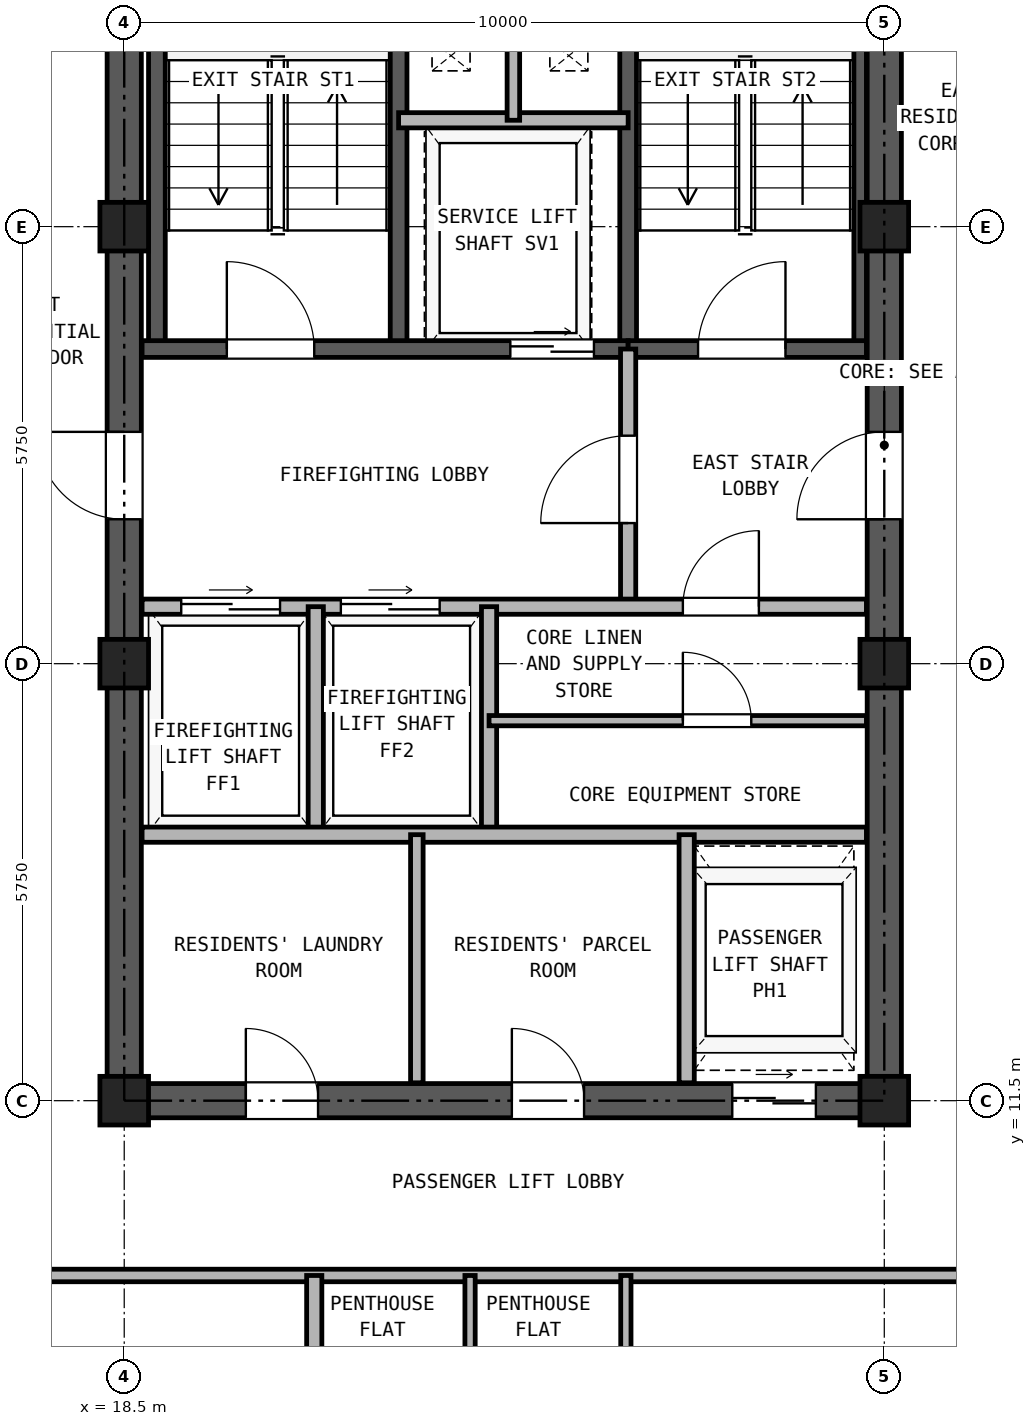
"""IFC4 building model, lengths in metres.
Left out: names, types, materials, properties, quantities, classifications, styles, units other than length and angle.
Written with IfcOpenShell. Run it as: python <this file> out.ifc"""

import sys

from ifc_helpers import new_model, si_unit, direction, frame, frame_2d, origin, origin_2d, place, context, subcontext, project, spatial, rectangle, hollow_rectangle, extrude, source, transform, mapped, element, fill, save


model = new_model("IFC4")
c1 = context("Model", 3, precision=1e-05, world=origin(), true_north=direction((0.0, 1.0)))
c2 = subcontext(c1, "Body", "Model", "MODEL_VIEW")
j1 = project(units=[si_unit("LENGTHUNIT", "METRE"), si_unit("PLANEANGLEUNIT", "RADIAN")], contexts=[c1])
p1 = place(None, origin())
s1 = spatial("IfcSite", under=j1, at=p1, CompositionType="ELEMENT")
p2 = place(p1, origin())
s2 = spatial("IfcBuilding", under=s1, at=p2, CompositionType="ELEMENT")
p3 = place(p2, frame((0.0, 0.0, 181.7)))
s3 = spatial("IfcBuildingStorey", under=s2, at=p3, CompositionType="ELEMENT", Elevation=181.7)
m1 = source(origin(), c2, "Body", "SweptSolid", [
    extrude(hollow_rectangle(XDim=0.64, YDim=0.64, WallThickness=0.035, at=origin_2d()), origin(), (0.0, 0.0, 1.0), 2.95),
])
for number, where, z_axis, x_axis in (
    (1, (18.5, 11.5, 0.0), (0.0, 0.0, 1.0), (1.0, 0.0, 0.0)),
    (2, (18.5, 17.25, 0.0), (0.0, 0.0, 1.0), (1.0, 0.0, 0.0)),
    (3, (18.5, 23.0, 0.0), (0.0, 0.0, 1.0), (1.0, 0.0, 0.0)),
    (4, (28.5, 11.5, 0.0), (0.0, 0.0, 1.0), (1.0, 0.0, 0.0)),
    (5, (28.5, 17.25, 0.0), (0.0, 0.0, 1.0), (1.0, 0.0, 0.0)),
    (6, (28.5, 23.0, 0.0), (0.0, 0.0, 1.0), (1.0, 0.0, 0.0)),
):
    element("IfcColumn", number, at=place(p3, frame(where, z_axis=z_axis, x_axis=x_axis)), inside=s3, PredefinedType="COLUMN", context=c2, shape_type="MappedRepresentation", body=[
        mapped(m1, transform((0.0, 0.0, 0.0), x_axis=(1.0, 0.0, 0.0), y_axis=(0.0, 1.0, 0.0), z_axis=(0.0, 0.0, 1.0), scale=1.0)),
    ])
p4 = place(p3, frame((18.275, 11.5, 0.0), z_axis=(0.0, 0.0, 1.0), x_axis=(1.0, 0.0, 0.0)))
e7 = element("IfcWall", 7, at=p4, inside=s3, PredefinedType="SHEAR", context=c2, shape_type="SweptSolid", body=[
    extrude(rectangle(XDim=10.45, YDim=0.45, at=frame_2d((5.225, 0.0))), origin(), (0.0, 0.0, 1.0), 2.95),
])
p5 = place(p4, frame((1.825, 0.0, 0.0)))
e8 = element("IfcOpeningElement", 8, at=p5, cuts=e7, PredefinedType="OPENING", context=c2, shape_type="SweptSolid", body=[
    extrude(rectangle(XDim=0.95, YDim=2.15, at=frame_2d((0.475, 1.075))), frame((0.0, 0.235, 0.0), z_axis=(0.0, -1.0, 0.0), x_axis=(1.0, 0.0, 0.0)), (0.0, 0.0, 1.0), 0.47),
])
p6 = place(p4, frame((5.325, 0.0, 0.0)))
e9 = element("IfcOpeningElement", 9, at=p6, cuts=e7, PredefinedType="OPENING", context=c2, shape_type="SweptSolid", body=[
    extrude(rectangle(XDim=0.95, YDim=2.15, at=frame_2d((0.475, 1.075))), frame((0.0, 0.235, 0.0), z_axis=(0.0, -1.0, 0.0), x_axis=(1.0, 0.0, 0.0)), (0.0, 0.0, 1.0), 0.47),
])
p7 = place(p4, frame((8.225, 0.0, 0.0)))
e10 = element("IfcOpeningElement", 10, at=p7, cuts=e7, PredefinedType="OPENING", context=c2, shape_type="SweptSolid", body=[
    extrude(rectangle(XDim=1.1, YDim=2.25, at=frame_2d((0.55, 1.125))), frame((0.0, 0.235, 0.0), z_axis=(0.0, -1.0, 0.0), x_axis=(1.0, 0.0, 0.0)), (0.0, 0.0, 1.0), 0.47),
])
p8 = place(p3, frame((18.5, 11.725, 0.0), z_axis=(0.0, 0.0, 1.0), x_axis=(0.0, 1.0, 0.0)))
e11 = element("IfcWall", 11, at=p8, inside=s3, PredefinedType="SHEAR", context=c2, shape_type="SweptSolid", body=[
    extrude(rectangle(XDim=16.8, YDim=0.45, at=frame_2d((8.4, 0.0))), origin(), (0.0, 0.0, 1.0), 2.95),
])
p9 = place(p8, frame((7.425, 0.0, 0.0)))
e12 = element("IfcOpeningElement", 12, at=p9, cuts=e11, PredefinedType="OPENING", context=c2, shape_type="SweptSolid", body=[
    extrude(rectangle(XDim=1.15, YDim=2.2, at=frame_2d((0.575, 1.1))), frame((0.0, 0.235, 0.0), z_axis=(0.0, -1.0, 0.0), x_axis=(1.0, 0.0, 0.0)), (0.0, 0.0, 1.0), 0.47),
])
p10 = place(p3, frame((28.5, 11.725, 0.0), z_axis=(0.0, 0.0, 1.0), x_axis=(0.0, 1.0, 0.0)))
e13 = element("IfcWall", 13, at=p10, inside=s3, PredefinedType="SHEAR", context=c2, shape_type="SweptSolid", body=[
    extrude(rectangle(XDim=16.8, YDim=0.45, at=frame_2d((8.4, 0.0))), origin(), (0.0, 0.0, 1.0), 2.95),
])
p11 = place(p10, frame((7.425, 0.0, 0.0)))
e14 = element("IfcOpeningElement", 14, at=p11, cuts=e13, PredefinedType="OPENING", context=c2, shape_type="SweptSolid", body=[
    extrude(rectangle(XDim=1.15, YDim=2.2, at=frame_2d((0.575, 1.1))), frame((0.0, 0.235, 0.0), z_axis=(0.0, -1.0, 0.0), x_axis=(1.0, 0.0, 0.0)), (0.0, 0.0, 1.0), 0.47),
])
for number, where, z_axis, x_axis in (
    (15, (18.93, 21.39, 0.0), (0.0, 0.0, 1.0), (0.0, 1.0, 0.0)),
    (16, (22.11, 21.39, 0.0), (0.0, 0.0, 1.0), (0.0, 1.0, 0.0)),
    (17, (25.13, 21.39, 0.0), (0.0, 0.0, 1.0), (0.0, 1.0, 0.0)),
):
    element("IfcWall", number, at=place(p3, frame(where, z_axis=z_axis, x_axis=x_axis)), inside=s3, PredefinedType="SOLIDWALL", context=c2, shape_type="SweptSolid", body=[
        extrude(rectangle(XDim=7.11, YDim=0.22, at=frame_2d((3.555, 0.0))), origin(), (0.0, 0.0, 1.0), 2.95),
    ])
p12 = place(p3, frame((28.183, 21.39, 0.0), z_axis=(0.0, 0.0, 1.0), x_axis=(0.0, 1.0, 0.0)))
e18 = element("IfcWall", 18, at=p12, inside=s3, PredefinedType="PARTITIONING", context=c2, shape_type="SweptSolid", body=[
    extrude(rectangle(XDim=6.945, YDim=0.165, at=frame_2d((3.473, 0.0))), origin(), (0.0, 0.0, 1.0), 2.95),
])
p13 = place(p3, frame((18.735, 21.39, 0.0), z_axis=(0.0, 0.0, 1.0), x_axis=(1.0, 0.0, 0.0)))
e19 = element("IfcWall", 19, at=p13, inside=s3, PredefinedType="SOLIDWALL", context=c2, shape_type="SweptSolid", body=[
    extrude(rectangle(XDim=6.395, YDim=0.22, at=frame_2d((3.197, 0.0))), origin(), (0.0, 0.0, 1.0), 2.95),
])
p14 = place(p13, frame((1.115, 0.0, 0.0)))
e20 = element("IfcOpeningElement", 20, at=p14, cuts=e19, PredefinedType="OPENING", context=c2, shape_type="SweptSolid", body=[
    extrude(rectangle(XDim=1.15, YDim=2.2, at=frame_2d((0.575, 1.1))), frame((0.0, 0.12, 0.0), z_axis=(0.0, -1.0, 0.0), x_axis=(1.0, 0.0, 0.0)), (0.0, 0.0, 1.0), 0.24),
])
p15 = place(p13, frame((4.845, 0.0, 0.0)))
e21 = element("IfcOpeningElement", 21, at=p15, cuts=e19, PredefinedType="OPENING", context=c2, shape_type="SweptSolid", body=[
    extrude(rectangle(XDim=1.1, YDim=2.25, at=frame_2d((0.55, 1.125))), frame((0.0, 0.12, 0.0), z_axis=(0.0, -1.0, 0.0), x_axis=(1.0, 0.0, 0.0)), (0.0, 0.0, 1.0), 0.24),
])
p16 = place(p3, frame((25.13, 21.39, 0.0), z_axis=(0.0, 0.0, 1.0), x_axis=(1.0, 0.0, 0.0)))
e22 = element("IfcWall", 22, at=p16, inside=s3, PredefinedType="SOLIDWALL", context=c2, shape_type="SweptSolid", body=[
    extrude(rectangle(XDim=3.135, YDim=0.22, at=frame_2d((1.567, 0.0))), origin(), (0.0, 0.0, 1.0), 2.95),
])
p17 = place(p16, frame((0.92, 0.0, 0.0)))
e23 = element("IfcOpeningElement", 23, at=p17, cuts=e22, PredefinedType="OPENING", context=c2, shape_type="SweptSolid", body=[
    extrude(rectangle(XDim=1.15, YDim=2.2, at=frame_2d((0.575, 1.1))), frame((0.0, 0.12, 0.0), z_axis=(0.0, -1.0, 0.0), x_axis=(1.0, 0.0, 0.0)), (0.0, 0.0, 1.0), 0.24),
])
p18 = place(p3, frame((22.11, 24.4, 0.0), z_axis=(0.0, 0.0, 1.0), x_axis=(1.0, 0.0, 0.0)))
e24 = element("IfcWall", 24, at=p18, inside=s3, PredefinedType="PARTITIONING", context=c2, shape_type="SweptSolid", body=[
    extrude(rectangle(XDim=3.02, YDim=0.2, at=frame_2d((1.51, 0.0))), origin(), (0.0, 0.0, 1.0), 2.95),
])
p19 = place(p3, frame((23.62, 24.4, 0.0), z_axis=(0.0, 0.0, 1.0), x_axis=(0.0, 1.0, 0.0)))
e25 = element("IfcWall", 25, at=p19, inside=s3, PredefinedType="PARTITIONING", context=c2, shape_type="SweptSolid", body=[
    extrude(rectangle(XDim=4.115, YDim=0.165, at=frame_2d((2.058, 0.0))), origin(), (0.0, 0.0, 1.0), 2.95),
])
p20 = place(p3, frame((25.13, 18.0, 0.0), z_axis=(0.0, 0.0, 1.0), x_axis=(0.0, 1.0, 0.0)))
e26 = element("IfcWall", 26, at=p20, inside=s3, PredefinedType="PARTITIONING", context=c2, shape_type="SweptSolid", body=[
    extrude(rectangle(XDim=3.39, YDim=0.2, at=frame_2d((1.695, 0.0))), origin(), (0.0, 0.0, 1.0), 2.95),
])
p21 = place(p20, frame((1.1, 0.0, 0.0)))
e27 = element("IfcOpeningElement", 27, at=p21, cuts=e26, PredefinedType="OPENING", context=c2, shape_type="SweptSolid", body=[
    extrude(rectangle(XDim=1.15, YDim=2.2, at=frame_2d((0.575, 1.1))), frame((0.0, 0.11, 0.0), z_axis=(0.0, -1.0, 0.0), x_axis=(1.0, 0.0, 0.0)), (0.0, 0.0, 1.0), 0.22),
])
p22 = place(p3, frame((18.735, 18.0, 0.0), z_axis=(0.0, 0.0, 1.0), x_axis=(1.0, 0.0, 0.0)))
e28 = element("IfcWall", 28, at=p22, inside=s3, PredefinedType="PARTITIONING", context=c2, shape_type="SweptSolid", body=[
    extrude(rectangle(XDim=9.53, YDim=0.2, at=frame_2d((4.765, 0.0))), origin(), (0.0, 0.0, 1.0), 2.95),
])
p23 = place(p22, frame((0.515, 0.0, 0.0)))
e29 = element("IfcOpeningElement", 29, at=p23, cuts=e28, PredefinedType="OPENING", context=c2, shape_type="SweptSolid", body=[
    extrude(rectangle(XDim=1.3, YDim=2.3, at=frame_2d((0.65, 1.15))), frame((0.0, 0.11, 0.0), z_axis=(0.0, -1.0, 0.0), x_axis=(1.0, 0.0, 0.0)), (0.0, 0.0, 1.0), 0.22),
])
p24 = place(p22, frame((2.615, 0.0, 0.0)))
e30 = element("IfcOpeningElement", 30, at=p24, cuts=e28, PredefinedType="OPENING", context=c2, shape_type="SweptSolid", body=[
    extrude(rectangle(XDim=1.3, YDim=2.3, at=frame_2d((0.65, 1.15))), frame((0.0, 0.11, 0.0), z_axis=(0.0, -1.0, 0.0), x_axis=(1.0, 0.0, 0.0)), (0.0, 0.0, 1.0), 0.22),
])
p25 = place(p22, frame((7.115, 0.0, 0.0)))
e31 = element("IfcOpeningElement", 31, at=p25, cuts=e28, PredefinedType="OPENING", context=c2, shape_type="SweptSolid", body=[
    extrude(rectangle(XDim=1.0, YDim=2.15, at=frame_2d((0.5, 1.075))), frame((0.0, 0.11, 0.0), z_axis=(0.0, -1.0, 0.0), x_axis=(1.0, 0.0, 0.0)), (0.0, 0.0, 1.0), 0.22),
])
for number, where, z_axis, x_axis in (
    (32, (21.02, 15.0, 0.0), (0.0, 0.0, 1.0), (0.0, 1.0, 0.0)),
    (33, (23.3, 15.0, 0.0), (0.0, 0.0, 1.0), (0.0, 1.0, 0.0)),
):
    element("IfcWall", number, at=place(p3, frame(where, z_axis=z_axis, x_axis=x_axis)), inside=s3, PredefinedType="PARTITIONING", context=c2, shape_type="SweptSolid", body=[
        extrude(rectangle(XDim=3.0, YDim=0.2, at=frame_2d((1.5, 0.0))), origin(), (0.0, 0.0, 1.0), 2.95),
    ])
p26 = place(p3, frame((18.735, 15.0, 0.0), z_axis=(0.0, 0.0, 1.0), x_axis=(1.0, 0.0, 0.0)))
e34 = element("IfcWall", 34, at=p26, inside=s3, PredefinedType="PARTITIONING", context=c2, shape_type="SweptSolid", body=[
    extrude(rectangle(XDim=9.53, YDim=0.2, at=frame_2d((4.765, 0.0))), origin(), (0.0, 0.0, 1.0), 2.95),
])
p27 = place(p3, frame((23.3, 16.5, 0.0), z_axis=(0.0, 0.0, 1.0), x_axis=(1.0, 0.0, 0.0)))
e35 = element("IfcWall", 35, at=p27, inside=s3, PredefinedType="PARTITIONING", context=c2, shape_type="SweptSolid", body=[
    extrude(rectangle(XDim=4.965, YDim=0.135, at=frame_2d((2.482, 0.0))), origin(), (0.0, 0.0, 1.0), 2.95),
])
p28 = place(p27, frame((2.55, 0.0, 0.0)))
e36 = element("IfcOpeningElement", 36, at=p28, cuts=e35, PredefinedType="OPENING", context=c2, shape_type="SweptSolid", body=[
    extrude(rectangle(XDim=0.9, YDim=2.05, at=frame_2d((0.45, 1.025))), frame((0.0, 0.077, 0.0), z_axis=(0.0, -1.0, 0.0), x_axis=(1.0, 0.0, 0.0)), (0.0, 0.0, 1.0), 0.155),
])
p29 = place(p3, frame((22.35, 11.735, 0.0), z_axis=(0.0, 0.0, 1.0), x_axis=(0.0, 1.0, 0.0)))
e37 = element("IfcWall", 37, at=p29, inside=s3, PredefinedType="PARTITIONING", context=c2, shape_type="SweptSolid", body=[
    extrude(rectangle(XDim=3.265, YDim=0.165, at=frame_2d((1.632, 0.0))), origin(), (0.0, 0.0, 1.0), 2.95),
])
p30 = place(p3, frame((25.9, 11.735, 0.0), z_axis=(0.0, 0.0, 1.0), x_axis=(0.0, 1.0, 0.0)))
e38 = element("IfcWall", 38, at=p30, inside=s3, PredefinedType="PARTITIONING", context=c2, shape_type="SweptSolid", body=[
    extrude(rectangle(XDim=3.265, YDim=0.2, at=frame_2d((1.632, 0.0))), origin(), (0.0, 0.0, 1.0), 2.95),
])
p31 = place(p3, frame((0.16, 9.2, 0.0), z_axis=(0.0, 0.0, 1.0), x_axis=(1.0, 0.0, 0.0)))
e39 = element("IfcWall", 39, at=p31, inside=s3, PredefinedType="PARTITIONING", context=c2, shape_type="SweptSolid", body=[
    extrude(rectangle(XDim=41.48, YDim=0.165, at=frame_2d((20.74, 0.0))), origin(), (0.0, 0.0, 1.0), 2.95),
])
p32 = place(p31, frame((15.565, 0.0, 0.0)))
e40 = element("IfcOpeningElement", 40, at=p32, cuts=e39, PredefinedType="OPENING", context=c2, shape_type="SweptSolid", body=[
    extrude(rectangle(XDim=1.0, YDim=2.15, at=frame_2d((0.5, 1.075))), frame((0.0, 0.093, 0.0), z_axis=(0.0, -1.0, 0.0), x_axis=(1.0, 0.0, 0.0)), (0.0, 0.0, 1.0), 0.185),
])
p33 = place(p31, frame((30.94, 0.0, 0.0)))
e41 = element("IfcOpeningElement", 41, at=p33, cuts=e39, PredefinedType="OPENING", context=c2, shape_type="SweptSolid", body=[
    extrude(rectangle(XDim=1.0, YDim=2.15, at=frame_2d((0.5, 1.075))), frame((0.0, 0.093, 0.0), z_axis=(0.0, -1.0, 0.0), x_axis=(1.0, 0.0, 0.0)), (0.0, 0.0, 1.0), 0.185),
])
p34 = place(p3, frame((21.0, 0.16, 0.0), z_axis=(0.0, 0.0, 1.0), x_axis=(0.0, 1.0, 0.0)))
e42 = element("IfcWall", 42, at=p34, inside=s3, PredefinedType="PARTITIONING", context=c2, shape_type="SweptSolid", body=[
    extrude(rectangle(XDim=9.04, YDim=0.2, at=frame_2d((4.52, 0.0))), origin(), (0.0, 0.0, 1.0), 2.95),
])
for number, where, z_axis, x_axis in (
    (43, (23.05, 7.05, 0.0), (0.0, 0.0, 1.0), (0.0, 1.0, 0.0)),
    (44, (25.1, 7.05, 0.0), (0.0, 0.0, 1.0), (0.0, 1.0, 0.0)),
):
    element("IfcWall", number, at=place(p3, frame(where, z_axis=z_axis, x_axis=x_axis)), inside=s3, PredefinedType="PARTITIONING", context=c2, shape_type="SweptSolid", body=[
        extrude(rectangle(XDim=2.15, YDim=0.135, at=frame_2d((1.075, 0.0))), origin(), (0.0, 0.0, 1.0), 2.95),
    ])
p35 = place(p14, frame((1.15, 0.0, 0.0), z_axis=(0.0, 0.0, 1.0), x_axis=(-1.0, 0.0, 0.0)))
e45 = element("IfcDoor", 45, at=p35, inside=s3, OperationType="SINGLE_SWING_LEFT", PredefinedType="DOOR", context=c2, shape_type="SweptSolid", body=[
    extrude(rectangle(XDim=1.15, YDim=2.2, at=frame_2d((0.575, 1.1))), frame((0.0, 0.025, 0.0), z_axis=(0.0, -1.0, 0.0), x_axis=(1.0, 0.0, 0.0)), (0.0, 0.0, 1.0), 0.05),
])
fill(e20, e45)
p36 = place(p17, frame((1.15, 0.0, 0.0), z_axis=(0.0, 0.0, 1.0), x_axis=(-1.0, 0.0, 0.0)))
e46 = element("IfcDoor", 46, at=p36, inside=s3, OperationType="SINGLE_SWING_RIGHT", PredefinedType="DOOR", context=c2, shape_type="SweptSolid", body=[
    extrude(rectangle(XDim=1.15, YDim=2.2, at=frame_2d((0.575, 1.1))), frame((0.0, 0.025, 0.0), z_axis=(0.0, -1.0, 0.0), x_axis=(1.0, 0.0, 0.0)), (0.0, 0.0, 1.0), 0.05),
])
fill(e23, e46)
p37 = place(p15, frame((1.1, 0.0, 0.0), z_axis=(0.0, 0.0, 1.0), x_axis=(-1.0, 0.0, 0.0)))
e47 = element("IfcDoor", 47, at=p37, inside=s3, OperationType="DOUBLE_DOOR_SLIDING", PredefinedType="DOOR", context=c2, shape_type="SweptSolid", body=[
    extrude(rectangle(XDim=1.1, YDim=2.25, at=frame_2d((0.55, 1.125))), frame((0.0, 0.025, 0.0), z_axis=(0.0, -1.0, 0.0), x_axis=(1.0, 0.0, 0.0)), (0.0, 0.0, 1.0), 0.05),
])
fill(e21, e47)
p38 = place(p21, origin())
e48 = element("IfcDoor", 48, at=p38, inside=s3, OperationType="SINGLE_SWING_LEFT", PredefinedType="DOOR", context=c2, shape_type="SweptSolid", body=[
    extrude(rectangle(XDim=1.15, YDim=2.2, at=frame_2d((0.575, 1.1))), frame((0.0, 0.025, 0.0), z_axis=(0.0, -1.0, 0.0), x_axis=(1.0, 0.0, 0.0)), (0.0, 0.0, 1.0), 0.05),
])
fill(e27, e48)
p39 = place(p23, origin())
e49 = element("IfcDoor", 49, at=p39, inside=s3, OperationType="DOUBLE_DOOR_SLIDING", PredefinedType="DOOR", context=c2, shape_type="SweptSolid", body=[
    extrude(rectangle(XDim=1.3, YDim=2.3, at=frame_2d((0.65, 1.15))), frame((0.0, 0.025, 0.0), z_axis=(0.0, -1.0, 0.0), x_axis=(1.0, 0.0, 0.0)), (0.0, 0.0, 1.0), 0.05),
])
fill(e29, e49)
p40 = place(p24, origin())
e50 = element("IfcDoor", 50, at=p40, inside=s3, OperationType="DOUBLE_DOOR_SLIDING", PredefinedType="DOOR", context=c2, shape_type="SweptSolid", body=[
    extrude(rectangle(XDim=1.3, YDim=2.3, at=frame_2d((0.65, 1.15))), frame((0.0, 0.025, 0.0), z_axis=(0.0, -1.0, 0.0), x_axis=(1.0, 0.0, 0.0)), (0.0, 0.0, 1.0), 0.05),
])
fill(e30, e50)
p41 = place(p25, frame((1.0, 0.0, 0.0), z_axis=(0.0, 0.0, 1.0), x_axis=(-1.0, 0.0, 0.0)))
e51 = element("IfcDoor", 51, at=p41, inside=s3, OperationType="SINGLE_SWING_RIGHT", PredefinedType="DOOR", context=c2, shape_type="SweptSolid", body=[
    extrude(rectangle(XDim=1.0, YDim=2.15, at=frame_2d((0.5, 1.075))), frame((0.0, 0.025, 0.0), z_axis=(0.0, -1.0, 0.0), x_axis=(1.0, 0.0, 0.0)), (0.0, 0.0, 1.0), 0.05),
])
fill(e31, e51)
p42 = place(p28, frame((0.9, 0.0, 0.0), z_axis=(0.0, 0.0, 1.0), x_axis=(-1.0, 0.0, 0.0)))
e52 = element("IfcDoor", 52, at=p42, inside=s3, OperationType="SINGLE_SWING_LEFT", PredefinedType="DOOR", context=c2, shape_type="SweptSolid", body=[
    extrude(rectangle(XDim=0.9, YDim=2.05, at=frame_2d((0.45, 1.025))), frame((0.0, 0.025, 0.0), z_axis=(0.0, -1.0, 0.0), x_axis=(1.0, 0.0, 0.0)), (0.0, 0.0, 1.0), 0.05),
])
fill(e36, e52)
p43 = place(p9, frame((1.15, 0.0, 0.0), z_axis=(0.0, 0.0, 1.0), x_axis=(-1.0, 0.0, 0.0)))
e53 = element("IfcDoor", 53, at=p43, inside=s3, OperationType="SINGLE_SWING_RIGHT", PredefinedType="DOOR", context=c2, shape_type="SweptSolid", body=[
    extrude(rectangle(XDim=1.15, YDim=2.2, at=frame_2d((0.575, 1.1))), frame((0.0, 0.025, 0.0), z_axis=(0.0, -1.0, 0.0), x_axis=(1.0, 0.0, 0.0)), (0.0, 0.0, 1.0), 0.05),
])
fill(e12, e53)
p44 = place(p11, origin())
e54 = element("IfcDoor", 54, at=p44, inside=s3, OperationType="SINGLE_SWING_LEFT", PredefinedType="DOOR", context=c2, shape_type="SweptSolid", body=[
    extrude(rectangle(XDim=1.15, YDim=2.2, at=frame_2d((0.575, 1.1))), frame((0.0, 0.025, 0.0), z_axis=(0.0, -1.0, 0.0), x_axis=(1.0, 0.0, 0.0)), (0.0, 0.0, 1.0), 0.05),
])
fill(e14, e54)
p45 = place(p5, frame((0.95, 0.0, 0.0), z_axis=(0.0, 0.0, 1.0), x_axis=(-1.0, 0.0, 0.0)))
e55 = element("IfcDoor", 55, at=p45, inside=s3, OperationType="SINGLE_SWING_LEFT", PredefinedType="DOOR", context=c2, shape_type="SweptSolid", body=[
    extrude(rectangle(XDim=0.95, YDim=2.15, at=frame_2d((0.475, 1.075))), frame((0.0, 0.025, 0.0), z_axis=(0.0, -1.0, 0.0), x_axis=(1.0, 0.0, 0.0)), (0.0, 0.0, 1.0), 0.05),
])
fill(e8, e55)
p46 = place(p6, frame((0.95, 0.0, 0.0), z_axis=(0.0, 0.0, 1.0), x_axis=(-1.0, 0.0, 0.0)))
e56 = element("IfcDoor", 56, at=p46, inside=s3, OperationType="SINGLE_SWING_LEFT", PredefinedType="DOOR", context=c2, shape_type="SweptSolid", body=[
    extrude(rectangle(XDim=0.95, YDim=2.15, at=frame_2d((0.475, 1.075))), frame((0.0, 0.025, 0.0), z_axis=(0.0, -1.0, 0.0), x_axis=(1.0, 0.0, 0.0)), (0.0, 0.0, 1.0), 0.05),
])
fill(e9, e56)
p47 = place(p7, frame((1.1, 0.0, 0.0), z_axis=(0.0, 0.0, 1.0), x_axis=(-1.0, 0.0, 0.0)))
e57 = element("IfcDoor", 57, at=p47, inside=s3, OperationType="DOUBLE_DOOR_SLIDING", PredefinedType="DOOR", context=c2, shape_type="SweptSolid", body=[
    extrude(rectangle(XDim=1.1, YDim=2.25, at=frame_2d((0.55, 1.125))), frame((0.0, 0.025, 0.0), z_axis=(0.0, -1.0, 0.0), x_axis=(1.0, 0.0, 0.0)), (0.0, 0.0, 1.0), 0.05),
])
fill(e10, e57)
save(model, sys.argv[1])
